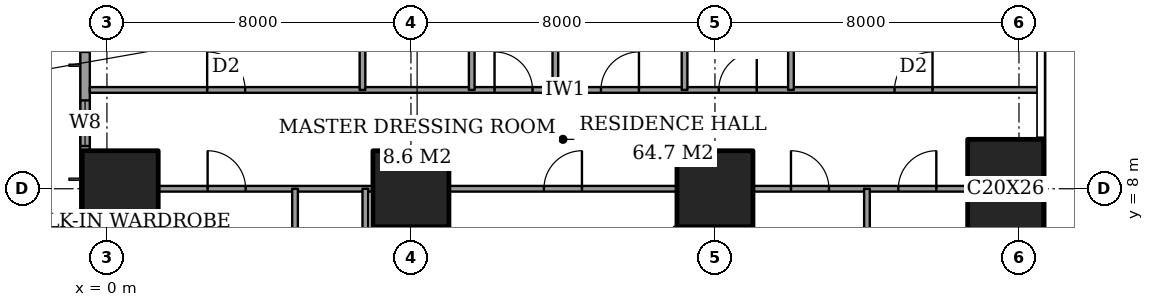
"""IFC4 building model, lengths in metres.
Left out: names, types, materials, properties, quantities, classifications, styles, units other than length and angle.
Written with IfcOpenShell. Run it as: python <this file> out.ifc"""

import sys

from ifc_helpers import new_model, si_unit, direction, frame, frame_2d, origin, origin_2d, place, context, subcontext, project, spatial, rectangle, extrude, element, fill, save


model = new_model("IFC4")
c1 = context("Model", 3, precision=1e-05, world=origin(), true_north=direction((0.0, 1.0)))
c2 = subcontext(c1, "Body", "Model", "MODEL_VIEW")
j1 = project(units=[si_unit("LENGTHUNIT", "METRE"), si_unit("PLANEANGLEUNIT", "RADIAN")], contexts=[c1])
p1 = place(None, origin())
s1 = spatial("IfcSite", under=j1, at=p1, CompositionType="ELEMENT")
p2 = place(p1, origin())
s2 = spatial("IfcBuilding", under=s1, at=p2, CompositionType="ELEMENT")
p3 = place(p2, frame((0.0, 0.0, 80.0)))
s3 = spatial("IfcBuildingStorey", under=s2, at=p3, CompositionType="ELEMENT", Elevation=80.0)
for number, where, z_axis, x_axis in (
    (1, (0.35, 8.0, 0.0), (0.0, 0.0, 1.0), (1.0, 0.0, 0.0)),
    (2, (8.0, 8.0, 0.0), (0.0, 0.0, 1.0), (1.0, 0.0, 0.0)),
    (3, (16.0, 8.0, 0.0), (0.0, 0.0, 1.0), (1.0, 0.0, 0.0)),
):
    element("IfcColumn", number, at=place(p3, frame(where, z_axis=z_axis, x_axis=x_axis)), inside=s3, PredefinedType="COLUMN", context=c2, shape_type="SweptSolid", body=[
        extrude(rectangle(XDim=2.0, YDim=2.0, at=origin_2d()), origin(), (0.0, 0.0, 1.0), 3.6),
    ])
p4 = place(p3, frame((23.65, 8.0, 0.0), z_axis=(0.0, 0.0, 1.0), x_axis=(1.0, 0.0, 0.0)))
e4 = element("IfcColumn", 4, at=p4, inside=s3, PredefinedType="COLUMN", context=c2, shape_type="SweptSolid", body=[
    extrude(rectangle(XDim=2.0, YDim=2.6, at=origin_2d()), origin(), (0.0, 0.0, 1.0), 3.6),
])
p5 = place(p3, frame((-0.575, 44.825, 0.0), z_axis=(0.0, 0.0, 1.0), x_axis=(0.0, -1.0, 0.0)))
e5 = element("IfcWall", 5, at=p5, inside=s3, PredefinedType="SOLIDWALL", context=c2, shape_type="SweptSolid", body=[
    extrude(rectangle(XDim=41.65, YDim=0.25, at=frame_2d((20.825, 0.0))), origin(), (0.0, 0.0, 1.0), 3.6),
])
p6 = place(p5, frame((0.775, 0.0, 0.6)))
e6 = element("IfcOpeningElement", 6, at=p6, cuts=e5, PredefinedType="OPENING", context=c2, shape_type="SweptSolid", body=[
    extrude(rectangle(XDim=2.4, YDim=2.0, at=frame_2d((1.2, 1.0))), frame((0.0, 0.135, 0.0), z_axis=(0.0, -1.0, 0.0), x_axis=(1.0, 0.0, 0.0)), (0.0, 0.0, 1.0), 0.27),
])
p7 = place(p5, frame((6.1, 0.0, 0.6)))
e7 = element("IfcOpeningElement", 7, at=p7, cuts=e5, PredefinedType="OPENING", context=c2, shape_type="SweptSolid", body=[
    extrude(rectangle(XDim=1.2, YDim=2.0, at=frame_2d((0.6, 1.0))), frame((0.0, 0.135, 0.0), z_axis=(0.0, -1.0, 0.0), x_axis=(1.0, 0.0, 0.0)), (0.0, 0.0, 1.0), 0.27),
])
p8 = place(p5, frame((8.425, 0.0, 0.6)))
e8 = element("IfcOpeningElement", 8, at=p8, cuts=e5, PredefinedType="OPENING", context=c2, shape_type="SweptSolid", body=[
    extrude(rectangle(XDim=2.4, YDim=2.0, at=frame_2d((1.2, 1.0))), frame((0.0, 0.135, 0.0), z_axis=(0.0, -1.0, 0.0), x_axis=(1.0, 0.0, 0.0)), (0.0, 0.0, 1.0), 0.27),
])
p9 = place(p5, frame((15.625, 0.0, 0.6)))
e9 = element("IfcOpeningElement", 9, at=p9, cuts=e5, PredefinedType="OPENING", context=c2, shape_type="SweptSolid", body=[
    extrude(rectangle(XDim=2.4, YDim=2.0, at=frame_2d((1.2, 1.0))), frame((0.0, 0.135, 0.0), z_axis=(0.0, -1.0, 0.0), x_axis=(1.0, 0.0, 0.0)), (0.0, 0.0, 1.0), 0.27),
])
p10 = place(p5, frame((23.625, 0.0, 0.6)))
e10 = element("IfcOpeningElement", 10, at=p10, cuts=e5, PredefinedType="OPENING", context=c2, shape_type="SweptSolid", body=[
    extrude(rectangle(XDim=2.4, YDim=2.0, at=frame_2d((1.2, 1.0))), frame((0.0, 0.135, 0.0), z_axis=(0.0, -1.0, 0.0), x_axis=(1.0, 0.0, 0.0)), (0.0, 0.0, 1.0), 0.27),
])
p11 = place(p5, frame((30.825, 0.0, 0.6)))
e11 = element("IfcOpeningElement", 11, at=p11, cuts=e5, PredefinedType="OPENING", context=c2, shape_type="SweptSolid", body=[
    extrude(rectangle(XDim=2.4, YDim=2.0, at=frame_2d((1.2, 1.0))), frame((0.0, 0.135, 0.0), z_axis=(0.0, -1.0, 0.0), x_axis=(1.0, 0.0, 0.0)), (0.0, 0.0, 1.0), 0.27),
])
p12 = place(p5, frame((34.5, 0.0, 0.6)))
e12 = element("IfcOpeningElement", 12, at=p12, cuts=e5, PredefinedType="OPENING", context=c2, shape_type="SweptSolid", body=[
    extrude(rectangle(XDim=1.2, YDim=2.0, at=frame_2d((0.6, 1.0))), frame((0.0, 0.135, 0.0), z_axis=(0.0, -1.0, 0.0), x_axis=(1.0, 0.0, 0.0)), (0.0, 0.0, 1.0), 0.27),
])
p13 = place(p5, frame((38.475, 0.0, 0.6)))
e13 = element("IfcOpeningElement", 13, at=p13, cuts=e5, PredefinedType="OPENING", context=c2, shape_type="SweptSolid", body=[
    extrude(rectangle(XDim=2.4, YDim=2.0, at=frame_2d((1.2, 1.0))), frame((0.0, 0.135, 0.0), z_axis=(0.0, -1.0, 0.0), x_axis=(1.0, 0.0, 0.0)), (0.0, 0.0, 1.0), 0.27),
])
p14 = place(p3, frame((1.35, 8.0, 0.0), z_axis=(0.0, 0.0, 1.0), x_axis=(1.0, 0.0, 0.0)))
e14 = element("IfcWall", 14, at=p14, inside=s3, PredefinedType="PARTITIONING", context=c2, shape_type="SweptSolid", body=[
    extrude(rectangle(XDim=5.65, YDim=0.15, at=frame_2d((2.825, 0.0))), origin(), (0.0, 0.0, 1.0), 3.35),
])
p15 = place(p14, frame((1.3, 0.0, 0.0)))
e15 = element("IfcOpeningElement", 15, at=p15, cuts=e14, PredefinedType="OPENING", context=c2, shape_type="SweptSolid", body=[
    extrude(rectangle(XDim=1.0, YDim=2.1, at=frame_2d((0.5, 1.05))), frame((0.0, 0.085, 0.0), z_axis=(0.0, -1.0, 0.0), x_axis=(1.0, 0.0, 0.0)), (0.0, 0.0, 1.0), 0.17),
])
p16 = place(p3, frame((9.0, 8.0, 0.0), z_axis=(0.0, 0.0, 1.0), x_axis=(1.0, 0.0, 0.0)))
e16 = element("IfcWall", 16, at=p16, inside=s3, PredefinedType="PARTITIONING", context=c2, shape_type="SweptSolid", body=[
    extrude(rectangle(XDim=6.0, YDim=0.15, at=frame_2d((3.0, 0.0))), origin(), (0.0, 0.0, 1.0), 3.35),
])
p17 = place(p16, frame((2.5, 0.0, 0.0)))
e17 = element("IfcOpeningElement", 17, at=p17, cuts=e16, PredefinedType="OPENING", context=c2, shape_type="SweptSolid", body=[
    extrude(rectangle(XDim=1.0, YDim=2.1, at=frame_2d((0.5, 1.05))), frame((0.0, 0.085, 0.0), z_axis=(0.0, -1.0, 0.0), x_axis=(1.0, 0.0, 0.0)), (0.0, 0.0, 1.0), 0.17),
])
p18 = place(p3, frame((17.0, 8.0, 0.0), z_axis=(0.0, 0.0, 1.0), x_axis=(1.0, 0.0, 0.0)))
e18 = element("IfcWall", 18, at=p18, inside=s3, PredefinedType="PARTITIONING", context=c2, shape_type="SweptSolid", body=[
    extrude(rectangle(XDim=5.65, YDim=0.15, at=frame_2d((2.825, 0.0))), origin(), (0.0, 0.0, 1.0), 3.35),
])
p19 = place(p18, frame((1.0, 0.0, 0.0)))
e19 = element("IfcOpeningElement", 19, at=p19, cuts=e18, PredefinedType="OPENING", context=c2, shape_type="SweptSolid", body=[
    extrude(rectangle(XDim=1.0, YDim=2.1, at=frame_2d((0.5, 1.05))), frame((0.0, 0.085, 0.0), z_axis=(0.0, -1.0, 0.0), x_axis=(1.0, 0.0, 0.0)), (0.0, 0.0, 1.0), 0.17),
])
p20 = place(p18, frame((3.825, 0.0, 0.0)))
e20 = element("IfcOpeningElement", 20, at=p20, cuts=e18, PredefinedType="OPENING", context=c2, shape_type="SweptSolid", body=[
    extrude(rectangle(XDim=1.0, YDim=2.1, at=frame_2d((0.5, 1.05))), frame((0.0, 0.085, 0.0), z_axis=(0.0, -1.0, 0.0), x_axis=(1.0, 0.0, 0.0)), (0.0, 0.0, 1.0), 0.17),
])
p21 = place(p3, frame((-0.45, 10.6, 0.0), z_axis=(0.0, 0.0, 1.0), x_axis=(1.0, 0.0, 0.0)))
e21 = element("IfcWall", 21, at=p21, inside=s3, PredefinedType="PARTITIONING", context=c2, shape_type="SweptSolid", body=[
    extrude(rectangle(XDim=25.011, YDim=0.15, at=frame_2d((12.505, 0.0))), origin(), (0.0, 0.0, 1.0), 3.35),
])
p22 = place(p21, frame((10.65, 0.0, 0.0)))
e22 = element("IfcOpeningElement", 22, at=p22, cuts=e21, PredefinedType="OPENING", context=c2, shape_type="SweptSolid", body=[
    extrude(rectangle(XDim=1.0, YDim=2.1, at=frame_2d((0.5, 1.05))), frame((0.0, 0.085, 0.0), z_axis=(0.0, -1.0, 0.0), x_axis=(1.0, 0.0, 0.0)), (0.0, 0.0, 1.0), 0.17),
])
p23 = place(p21, frame((3.087, 0.0, 0.0)))
e23 = element("IfcOpeningElement", 23, at=p23, cuts=e21, PredefinedType="OPENING", context=c2, shape_type="SweptSolid", body=[
    extrude(rectangle(XDim=1.0, YDim=2.1, at=frame_2d((0.5, 1.05))), frame((0.0, 0.085, 0.0), z_axis=(0.0, -1.0, 0.0), x_axis=(1.0, 0.0, 0.0)), (0.0, 0.0, 1.0), 0.17),
])
p24 = place(p21, frame((13.45, 0.0, 0.0)))
e24 = element("IfcOpeningElement", 24, at=p24, cuts=e21, PredefinedType="OPENING", context=c2, shape_type="SweptSolid", body=[
    extrude(rectangle(XDim=1.0, YDim=2.1, at=frame_2d((0.5, 1.05))), frame((0.0, 0.085, 0.0), z_axis=(0.0, -1.0, 0.0), x_axis=(1.0, 0.0, 0.0)), (0.0, 0.0, 1.0), 0.17),
])
p25 = place(p21, frame((16.55, 0.0, 0.0)))
e25 = element("IfcOpeningElement", 25, at=p25, cuts=e21, PredefinedType="OPENING", context=c2, shape_type="SweptSolid", body=[
    extrude(rectangle(XDim=1.0, YDim=2.1, at=frame_2d((0.5, 1.05))), frame((0.0, 0.085, 0.0), z_axis=(0.0, -1.0, 0.0), x_axis=(1.0, 0.0, 0.0)), (0.0, 0.0, 1.0), 0.17),
])
p26 = place(p21, frame((21.175, 0.0, 0.0)))
e26 = element("IfcOpeningElement", 26, at=p26, cuts=e21, PredefinedType="OPENING", context=c2, shape_type="SweptSolid", body=[
    extrude(rectangle(XDim=1.0, YDim=2.1, at=frame_2d((0.5, 1.05))), frame((0.0, 0.085, 0.0), z_axis=(0.0, -1.0, 0.0), x_axis=(1.0, 0.0, 0.0)), (0.0, 0.0, 1.0), 0.17),
])
p27 = place(p3, frame((1.25, 3.3, 0.0), z_axis=(0.0, 0.0, 1.0), x_axis=(0.0, 1.0, 0.0)))
e27 = element("IfcWall", 27, at=p27, inside=s3, PredefinedType="PARTITIONING", context=c2, shape_type="SweptSolid", body=[
    extrude(rectangle(XDim=3.7, YDim=0.15, at=frame_2d((1.85, 0.0))), origin(), (0.0, 0.0, 1.0), 3.35),
])
p28 = place(p27, frame((1.4, 0.0, 0.0)))
e28 = element("IfcOpeningElement", 28, at=p28, cuts=e27, PredefinedType="OPENING", context=c2, shape_type="SweptSolid", body=[
    extrude(rectangle(XDim=0.9, YDim=2.1, at=frame_2d((0.45, 1.05))), frame((0.0, 0.085, 0.0), z_axis=(0.0, -1.0, 0.0), x_axis=(1.0, 0.0, 0.0)), (0.0, 0.0, 1.0), 0.17),
])
p29 = place(p3, frame((4.95, -0.45, 0.0), z_axis=(0.0, 0.0, 1.0), x_axis=(0.0, 1.0, 0.0)))
e29 = element("IfcWall", 29, at=p29, inside=s3, PredefinedType="PARTITIONING", context=c2, shape_type="SweptSolid", body=[
    extrude(rectangle(XDim=8.45, YDim=0.15, at=frame_2d((4.225, 0.0))), origin(), (0.0, 0.0, 1.0), 3.35),
])
p30 = place(p29, frame((3.775, 0.0, 0.0)))
e30 = element("IfcOpeningElement", 30, at=p30, cuts=e29, PredefinedType="OPENING", context=c2, shape_type="SweptSolid", body=[
    extrude(rectangle(XDim=0.9, YDim=2.1, at=frame_2d((0.45, 1.05))), frame((0.0, 0.085, 0.0), z_axis=(0.0, -1.0, 0.0), x_axis=(1.0, 0.0, 0.0)), (0.0, 0.0, 1.0), 0.17),
])
p31 = place(p3, frame((6.725, 10.6, 0.0), z_axis=(0.0, 0.0, 1.0), x_axis=(0.0, 1.0, 0.0)))
e31 = element("IfcWall", 31, at=p31, inside=s3, PredefinedType="PARTITIONING", context=c2, shape_type="SweptSolid", body=[
    extrude(rectangle(XDim=4.2, YDim=0.15, at=frame_2d((2.1, 0.0))), origin(), (0.0, 0.0, 1.0), 3.35),
])
p32 = place(p31, frame((1.05, 0.0, 0.0)))
e32 = element("IfcOpeningElement", 32, at=p32, cuts=e31, PredefinedType="OPENING", context=c2, shape_type="SweptSolid", body=[
    extrude(rectangle(XDim=0.9, YDim=2.1, at=frame_2d((0.45, 1.05))), frame((0.0, 0.085, 0.0), z_axis=(0.0, -1.0, 0.0), x_axis=(1.0, 0.0, 0.0)), (0.0, 0.0, 1.0), 0.17),
])
p33 = place(p3, frame((6.8, -0.45, 0.0), z_axis=(0.0, 0.0, 1.0), x_axis=(0.0, 1.0, 0.0)))
e33 = element("IfcWall", 33, at=p33, inside=s3, PredefinedType="PARTITIONING", context=c2, shape_type="SweptSolid", body=[
    extrude(rectangle(XDim=8.45, YDim=0.15, at=frame_2d((4.225, 0.0))), origin(), (0.0, 0.0, 1.0), 3.35),
])
p34 = place(p3, frame((9.6, 10.6, 0.0), z_axis=(0.0, 0.0, 1.0), x_axis=(0.0, 1.0, 0.0)))
e34 = element("IfcWall", 34, at=p34, inside=s3, PredefinedType="PARTITIONING", context=c2, shape_type="SweptSolid", body=[
    extrude(rectangle(XDim=11.0, YDim=0.15, at=frame_2d((5.5, 0.0))), origin(), (0.0, 0.0, 1.0), 3.35),
])
p35 = place(p34, frame((7.7, 0.0, 0.0)))
e35 = element("IfcOpeningElement", 35, at=p35, cuts=e34, PredefinedType="OPENING", context=c2, shape_type="SweptSolid", body=[
    extrude(rectangle(XDim=1.0, YDim=2.1, at=frame_2d((0.5, 1.05))), frame((0.0, 0.085, 0.0), z_axis=(0.0, -1.0, 0.0), x_axis=(1.0, 0.0, 0.0)), (0.0, 0.0, 1.0), 0.17),
])
p36 = place(p3, frame((11.8, 10.6, 0.0), z_axis=(0.0, 0.0, 1.0), x_axis=(0.0, 1.0, 0.0)))
e36 = element("IfcWall", 36, at=p36, inside=s3, PredefinedType="PARTITIONING", context=c2, shape_type="SweptSolid", body=[
    extrude(rectangle(XDim=5.4, YDim=0.15, at=frame_2d((2.7, 0.0))), origin(), (0.0, 0.0, 1.0), 3.35),
])
p37 = place(p3, frame((15.2, 10.6, 0.0), z_axis=(0.0, 0.0, 1.0), x_axis=(0.0, 1.0, 0.0)))
e37 = element("IfcWall", 37, at=p37, inside=s3, PredefinedType="PARTITIONING", context=c2, shape_type="SweptSolid", body=[
    extrude(rectangle(XDim=4.2, YDim=0.15, at=frame_2d((2.1, 0.0))), origin(), (0.0, 0.0, 1.0), 3.35),
])
p38 = place(p3, frame((18.0, 10.6, 0.0), z_axis=(0.0, 0.0, 1.0), x_axis=(0.0, 1.0, 0.0)))
e38 = element("IfcWall", 38, at=p38, inside=s3, PredefinedType="PARTITIONING", context=c2, shape_type="SweptSolid", body=[
    extrude(rectangle(XDim=13.4, YDim=0.15, at=frame_2d((6.7, 0.0))), origin(), (0.0, 0.0, 1.0), 3.35),
])
p39 = place(p38, frame((10.8, 0.0, 0.0)))
e39 = element("IfcOpeningElement", 39, at=p39, cuts=e38, PredefinedType="OPENING", context=c2, shape_type="SweptSolid", body=[
    extrude(rectangle(XDim=1.2, YDim=2.4, at=frame_2d((0.6, 1.2))), frame((0.0, 0.085, 0.0), z_axis=(0.0, -1.0, 0.0), x_axis=(1.0, 0.0, 0.0)), (0.0, 0.0, 1.0), 0.17),
])
p40 = place(p38, frame((7.25, 0.0, 0.0)))
e40 = element("IfcOpeningElement", 40, at=p40, cuts=e38, PredefinedType="OPENING", context=c2, shape_type="SweptSolid", body=[
    extrude(rectangle(XDim=0.9, YDim=2.1, at=frame_2d((0.45, 1.05))), frame((0.0, 0.085, 0.0), z_axis=(0.0, -1.0, 0.0), x_axis=(1.0, 0.0, 0.0)), (0.0, 0.0, 1.0), 0.17),
])
p41 = place(p3, frame((20.0, -0.45, 0.0), z_axis=(0.0, 0.0, 1.0), x_axis=(0.0, 1.0, 0.0)))
e41 = element("IfcWall", 41, at=p41, inside=s3, PredefinedType="PARTITIONING", context=c2, shape_type="SweptSolid", body=[
    extrude(rectangle(XDim=8.45, YDim=0.15, at=frame_2d((4.225, 0.0))), origin(), (0.0, 0.0, 1.0), 3.35),
])
p42 = place(p12, origin())
e42 = element("IfcWindow", 42, at=p42, inside=s3, PartitioningType="SINGLE_PANEL", PredefinedType="WINDOW", context=c2, shape_type="SweptSolid", body=[
    extrude(rectangle(XDim=1.2, YDim=2.0, at=frame_2d((0.6, 1.0))), frame((0.0, 0.03, 0.0), z_axis=(0.0, -1.0, 0.0), x_axis=(1.0, 0.0, 0.0)), (0.0, 0.0, 1.0), 0.06),
])
fill(e12, e42)
p43 = place(p15, origin())
e43 = element("IfcDoor", 43, at=p43, inside=s3, OperationType="SINGLE_SWING_RIGHT", PredefinedType="DOOR", context=c2, shape_type="SweptSolid", body=[
    extrude(rectangle(XDim=1.0, YDim=2.1, at=frame_2d((0.5, 1.05))), frame((0.0, 0.025, 0.0), z_axis=(0.0, -1.0, 0.0), x_axis=(1.0, 0.0, 0.0)), (0.0, 0.0, 1.0), 0.05),
])
fill(e15, e43)
p44 = place(p17, origin())
e44 = element("IfcDoor", 44, at=p44, inside=s3, OperationType="SINGLE_SWING_LEFT", PredefinedType="DOOR", context=c2, shape_type="SweptSolid", body=[
    extrude(rectangle(XDim=1.0, YDim=2.1, at=frame_2d((0.5, 1.05))), frame((0.0, 0.025, 0.0), z_axis=(0.0, -1.0, 0.0), x_axis=(1.0, 0.0, 0.0)), (0.0, 0.0, 1.0), 0.05),
])
fill(e17, e44)
p45 = place(p19, origin())
e45 = element("IfcDoor", 45, at=p45, inside=s3, OperationType="SINGLE_SWING_RIGHT", PredefinedType="DOOR", context=c2, shape_type="SweptSolid", body=[
    extrude(rectangle(XDim=1.0, YDim=2.1, at=frame_2d((0.5, 1.05))), frame((0.0, 0.025, 0.0), z_axis=(0.0, -1.0, 0.0), x_axis=(1.0, 0.0, 0.0)), (0.0, 0.0, 1.0), 0.05),
])
fill(e19, e45)
p46 = place(p20, origin())
e46 = element("IfcDoor", 46, at=p46, inside=s3, OperationType="SINGLE_SWING_LEFT", PredefinedType="DOOR", context=c2, shape_type="SweptSolid", body=[
    extrude(rectangle(XDim=1.0, YDim=2.1, at=frame_2d((0.5, 1.05))), frame((0.0, 0.025, 0.0), z_axis=(0.0, -1.0, 0.0), x_axis=(1.0, 0.0, 0.0)), (0.0, 0.0, 1.0), 0.05),
])
fill(e20, e46)
p47 = place(p22, origin())
e47 = element("IfcDoor", 47, at=p47, inside=s3, OperationType="SINGLE_SWING_RIGHT", PredefinedType="DOOR", context=c2, shape_type="SweptSolid", body=[
    extrude(rectangle(XDim=1.0, YDim=2.1, at=frame_2d((0.5, 1.05))), frame((0.0, 0.025, 0.0), z_axis=(0.0, -1.0, 0.0), x_axis=(1.0, 0.0, 0.0)), (0.0, 0.0, 1.0), 0.05),
])
fill(e22, e47)
p48 = place(p23, origin())
e48 = element("IfcDoor", 48, at=p48, inside=s3, OperationType="SINGLE_SWING_RIGHT", PredefinedType="DOOR", context=c2, shape_type="SweptSolid", body=[
    extrude(rectangle(XDim=1.0, YDim=2.1, at=frame_2d((0.5, 1.05))), frame((0.0, 0.025, 0.0), z_axis=(0.0, -1.0, 0.0), x_axis=(1.0, 0.0, 0.0)), (0.0, 0.0, 1.0), 0.05),
])
fill(e23, e48)
p49 = place(p24, origin())
e49 = element("IfcDoor", 49, at=p49, inside=s3, OperationType="SINGLE_SWING_LEFT", PredefinedType="DOOR", context=c2, shape_type="SweptSolid", body=[
    extrude(rectangle(XDim=1.0, YDim=2.1, at=frame_2d((0.5, 1.05))), frame((0.0, 0.025, 0.0), z_axis=(0.0, -1.0, 0.0), x_axis=(1.0, 0.0, 0.0)), (0.0, 0.0, 1.0), 0.05),
])
fill(e24, e49)
p50 = place(p25, origin())
e50 = element("IfcDoor", 50, at=p50, inside=s3, OperationType="SINGLE_SWING_LEFT", PredefinedType="DOOR", context=c2, shape_type="SweptSolid", body=[
    extrude(rectangle(XDim=1.0, YDim=2.1, at=frame_2d((0.5, 1.05))), frame((0.0, 0.025, 0.0), z_axis=(0.0, -1.0, 0.0), x_axis=(1.0, 0.0, 0.0)), (0.0, 0.0, 1.0), 0.05),
])
fill(e25, e50)
p51 = place(p26, origin())
e51 = element("IfcDoor", 51, at=p51, inside=s3, OperationType="SINGLE_SWING_LEFT", PredefinedType="DOOR", context=c2, shape_type="SweptSolid", body=[
    extrude(rectangle(XDim=1.0, YDim=2.1, at=frame_2d((0.5, 1.05))), frame((0.0, 0.025, 0.0), z_axis=(0.0, -1.0, 0.0), x_axis=(1.0, 0.0, 0.0)), (0.0, 0.0, 1.0), 0.05),
])
fill(e26, e51)
save(model, sys.argv[1])
